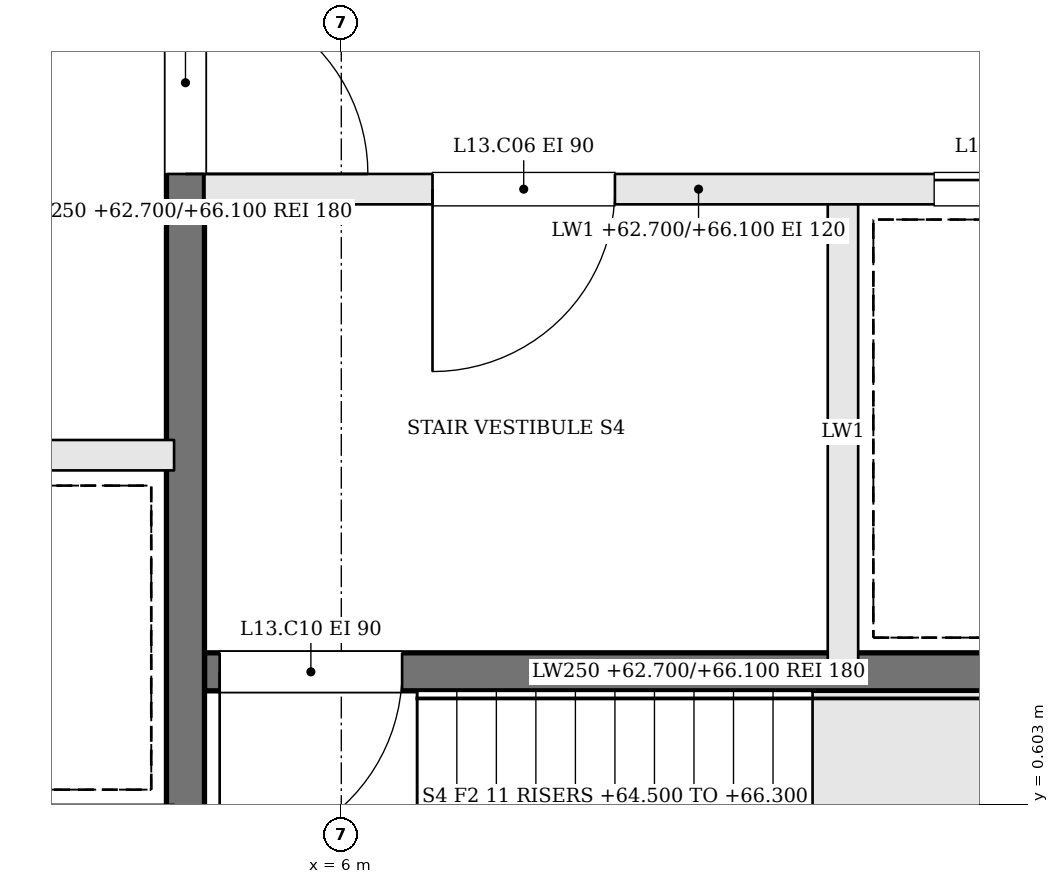
"""IFC4 building model, lengths in metres.
Left out: names, types, materials, properties, quantities, classifications, styles, units other than length and angle.
Written with IfcOpenShell. Run it as: python <this file> out.ifc"""

import sys

from ifc_helpers import new_model, si_unit, direction, frame, frame_2d, origin, place, context, subcontext, project, spatial, rectangle, extrude, element, fill, save


model = new_model("IFC4")
c1 = context("Model", 3, precision=1e-05, world=origin(), true_north=direction((0.0, 1.0)))
c2 = subcontext(c1, "Body", "Model", "MODEL_VIEW")
j1 = project(units=[si_unit("LENGTHUNIT", "METRE"), si_unit("PLANEANGLEUNIT", "RADIAN")], contexts=[c1])
p1 = place(None, origin())
s1 = spatial("IfcSite", under=j1, at=p1, CompositionType="ELEMENT")
p2 = place(p1, origin())
s2 = spatial("IfcBuilding", under=s1, at=p2, CompositionType="ELEMENT")
p3 = place(p2, frame((0.0, 0.0, 62.7)))
s3 = spatial("IfcBuildingStorey", under=s2, at=p3, CompositionType="ELEMENT", Elevation=62.7)
p4 = place(p3, frame((11.6, 4.65, 0.0), z_axis=(0.0, 0.0, 1.0), x_axis=(-1.0, 0.0, 0.0)))
e1 = element("IfcWall", 1, at=p4, inside=s3, PredefinedType="SOLIDWALL", context=c2, shape_type="SweptSolid", body=[
    extrude(rectangle(XDim=6.5, YDim=0.2, at=frame_2d((3.25, 0.0))), origin(), (0.0, 0.0, 1.0), 3.4),
])
p5 = place(p4, frame((3.8, 0.0, 0.0)))
e2 = element("IfcOpeningElement", 2, at=p5, cuts=e1, PredefinedType="OPENING", context=c2, shape_type="SweptSolid", body=[
    extrude(rectangle(XDim=1.2, YDim=2.1, at=frame_2d((0.6, 1.05))), frame((0.0, 0.11, 0.0), z_axis=(0.0, -1.0, 0.0), x_axis=(1.0, 0.0, 0.0)), (0.0, 0.0, 1.0), 0.22),
])
p6 = place(p4, frame((0.5, 0.0, 0.0)))
e3 = element("IfcOpeningElement", 3, at=p6, cuts=e1, PredefinedType="OPENING", context=c2, shape_type="SweptSolid", body=[
    extrude(rectangle(XDim=1.2, YDim=2.1, at=frame_2d((0.6, 1.05))), frame((0.0, 0.11, 0.0), z_axis=(0.0, -1.0, 0.0), x_axis=(1.0, 0.0, 0.0)), (0.0, 0.0, 1.0), 0.22),
])
p7 = place(p3, frame((11.6, 1.475, 0.0), z_axis=(0.0, 0.0, 1.0), x_axis=(-1.0, 0.0, 0.0)))
e4 = element("IfcWall", 4, at=p7, inside=s3, PredefinedType="SOLIDWALL", context=c2, shape_type="SweptSolid", body=[
    extrude(rectangle(XDim=6.5, YDim=0.25, at=frame_2d((3.25, 0.0))), origin(), (0.0, 0.0, 1.0), 3.4),
])
p8 = place(p7, frame((5.2, 0.0, 0.0)))
e5 = element("IfcOpeningElement", 5, at=p8, cuts=e4, PredefinedType="OPENING", context=c2, shape_type="SweptSolid", body=[
    extrude(rectangle(XDim=1.2, YDim=2.1, at=frame_2d((0.6, 1.05))), frame((0.0, 0.135, 0.0), z_axis=(0.0, -1.0, 0.0), x_axis=(1.0, 0.0, 0.0)), (0.0, 0.0, 1.0), 0.27),
])
p9 = place(p3, frame((9.3, 4.55, 0.0), z_axis=(0.0, 0.0, 1.0), x_axis=(0.0, -1.0, 0.0)))
e6 = element("IfcWall", 6, at=p9, inside=s3, PredefinedType="SOLIDWALL", context=c2, shape_type="SweptSolid", body=[
    extrude(rectangle(XDim=3.0, YDim=0.2, at=frame_2d((1.5, 0.0))), origin(), (0.0, 0.0, 1.0), 3.4),
])
p10 = place(p3, frame((4.975, 10.6, 0.0), z_axis=(0.0, 0.0, 1.0), x_axis=(0.0, -1.0, 0.0)))
e7 = element("IfcWall", 7, at=p10, inside=s3, PredefinedType="SOLIDWALL", context=c2, shape_type="SweptSolid", body=[
    extrude(rectangle(XDim=12.2, YDim=0.25, at=frame_2d((6.1, 0.0))), origin(), (0.0, 0.0, 1.0), 3.4),
])
p11 = place(p10, frame((4.65, 0.0, 0.0)))
e8 = element("IfcOpeningElement", 8, at=p11, cuts=e7, PredefinedType="OPENING", context=c2, shape_type="SweptSolid", body=[
    extrude(rectangle(XDim=1.2, YDim=2.1, at=frame_2d((0.6, 1.05))), frame((0.0, 0.135, 0.0), z_axis=(0.0, -1.0, 0.0), x_axis=(1.0, 0.0, 0.0)), (0.0, 0.0, 1.0), 0.27),
])
p12 = place(p3, frame((-4.9, 2.9, 0.0), z_axis=(0.0, 0.0, 1.0), x_axis=(1.0, 0.0, 0.0)))
e9 = element("IfcWall", 9, at=p12, inside=s3, PredefinedType="SOLIDWALL", context=c2, shape_type="SweptSolid", body=[
    extrude(rectangle(XDim=9.8, YDim=0.2, at=frame_2d((4.9, 0.0))), origin(), (0.0, 0.0, 1.0), 3.4),
])
p13 = place(p12, frame((0.675, 0.0, 0.0)))
e10 = element("IfcOpeningElement", 10, at=p13, cuts=e9, PredefinedType="OPENING", context=c2, shape_type="SweptSolid", body=[
    extrude(rectangle(XDim=1.1, YDim=2.1, at=frame_2d((0.55, 1.05))), frame((0.0, 0.11, 0.0), z_axis=(0.0, -1.0, 0.0), x_axis=(1.0, 0.0, 0.0)), (0.0, 0.0, 1.0), 0.22),
])
p14 = place(p12, frame((3.125, 0.0, 0.0)))
e11 = element("IfcOpeningElement", 11, at=p14, cuts=e9, PredefinedType="OPENING", context=c2, shape_type="SweptSolid", body=[
    extrude(rectangle(XDim=1.1, YDim=2.1, at=frame_2d((0.55, 1.05))), frame((0.0, 0.11, 0.0), z_axis=(0.0, -1.0, 0.0), x_axis=(1.0, 0.0, 0.0)), (0.0, 0.0, 1.0), 0.22),
])
p15 = place(p11, origin())
e12 = element("IfcDoor", 12, at=p15, inside=s3, OperationType="SINGLE_SWING_RIGHT", PredefinedType="DOOR", context=c2, shape_type="SweptSolid", body=[
    extrude(rectangle(XDim=1.2, YDim=2.1, at=frame_2d((0.6, 1.05))), frame((0.0, 0.025, 0.0), z_axis=(0.0, -1.0, 0.0), x_axis=(1.0, 0.0, 0.0)), (0.0, 0.0, 1.0), 0.05),
])
fill(e8, e12)
p16 = place(p5, origin())
e13 = element("IfcDoor", 13, at=p16, inside=s3, OperationType="SINGLE_SWING_RIGHT", PredefinedType="DOOR", context=c2, shape_type="SweptSolid", body=[
    extrude(rectangle(XDim=1.2, YDim=2.1, at=frame_2d((0.6, 1.05))), frame((0.0, 0.025, 0.0), z_axis=(0.0, -1.0, 0.0), x_axis=(1.0, 0.0, 0.0)), (0.0, 0.0, 1.0), 0.05),
])
fill(e2, e13)
p17 = place(p8, origin())
e14 = element("IfcDoor", 14, at=p17, inside=s3, OperationType="SINGLE_SWING_RIGHT", PredefinedType="DOOR", context=c2, shape_type="SweptSolid", body=[
    extrude(rectangle(XDim=1.2, YDim=2.1, at=frame_2d((0.6, 1.05))), frame((0.0, 0.025, 0.0), z_axis=(0.0, -1.0, 0.0), x_axis=(1.0, 0.0, 0.0)), (0.0, 0.0, 1.0), 0.05),
])
fill(e5, e14)
p18 = place(p6, origin())
e15 = element("IfcDoor", 15, at=p18, inside=s3, OperationType="SLIDING_TO_RIGHT", PredefinedType="DOOR", context=c2, shape_type="SweptSolid", body=[
    extrude(rectangle(XDim=1.2, YDim=2.1, at=frame_2d((0.6, 1.05))), frame((0.0, 0.025, 0.0), z_axis=(0.0, -1.0, 0.0), x_axis=(1.0, 0.0, 0.0)), (0.0, 0.0, 1.0), 0.05),
])
fill(e3, e15)
save(model, sys.argv[1])
